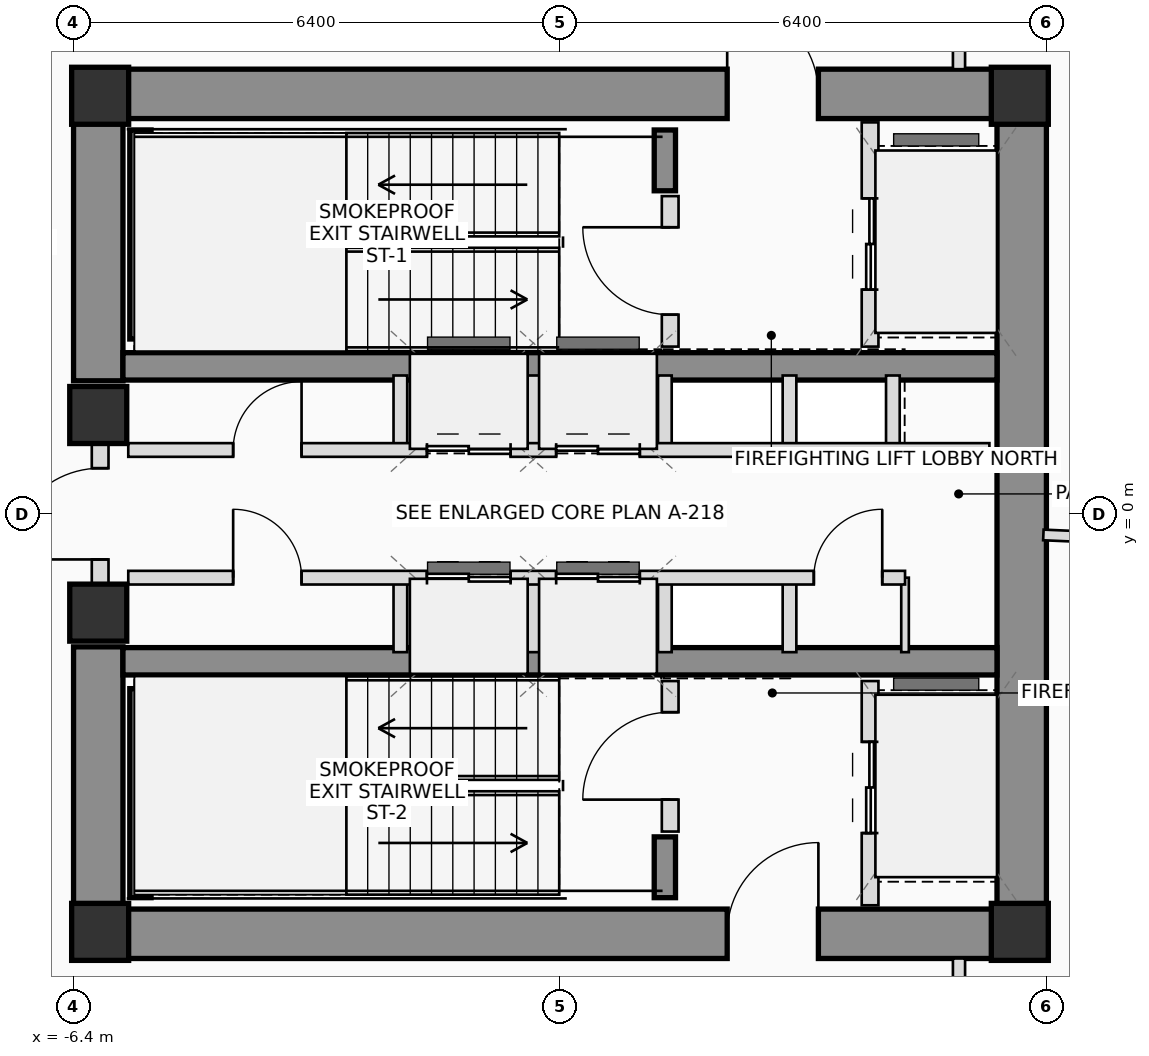
"""IFC4 building model, lengths in metres.
Left out: names, types, materials, properties, quantities, classifications, styles, units other than length and angle.
Written with IfcOpenShell. Run it as: python <this file> out.ifc"""

import sys

from ifc_helpers import new_model, si_unit, direction, frame, frame_2d, origin, origin_2d, place, context, subcontext, project, spatial, rectangle, extrude, source, transform, mapped, element, fill, save


model = new_model("IFC4")
c1 = context("Model", 3, precision=1e-05, world=origin(), true_north=direction((0.0, 1.0)))
c2 = subcontext(c1, "Body", "Model", "MODEL_VIEW")
j1 = project(units=[si_unit("LENGTHUNIT", "METRE"), si_unit("PLANEANGLEUNIT", "RADIAN")], contexts=[c1])
p1 = place(None, origin())
s1 = spatial("IfcSite", under=j1, at=p1, CompositionType="ELEMENT")
p2 = place(p1, origin())
s2 = spatial("IfcBuilding", under=s1, at=p2, CompositionType="ELEMENT")
p3 = place(p2, frame((0.0, 0.0, 191.45)))
s3 = spatial("IfcBuildingStorey", under=s2, at=p3, CompositionType="ELEMENT", Elevation=191.45)
m1 = source(origin(), c2, "Body", "SweptSolid", [
    extrude(rectangle(XDim=0.75, YDim=0.75, at=origin_2d()), origin(), (0.0, 0.0, 1.0), 3.45),
])
for number, where, z_axis, x_axis in (
    (1, (-6.05, -5.5, 0.0), (0.0, 0.0, 1.0), (1.0, 0.0, 0.0)),
    (2, (6.05, -5.5, 0.0), (0.0, 0.0, 1.0), (1.0, 0.0, 0.0)),
    (3, (6.05, 5.5, 0.0), (0.0, 0.0, 1.0), (1.0, 0.0, 0.0)),
    (4, (-6.05, 5.5, 0.0), (0.0, 0.0, 1.0), (1.0, 0.0, 0.0)),
):
    element("IfcColumn", number, at=place(p3, frame(where, z_axis=z_axis, x_axis=x_axis)), inside=s3, PredefinedType="COLUMN", context=c2, shape_type="MappedRepresentation", body=[
        mapped(m1, transform((0.0, 0.0, 0.0), scale=1.0)),
    ])
p4 = place(p3, frame((-6.4, 5.525, 0.0), z_axis=(0.0, 0.0, 1.0), x_axis=(1.0, 0.0, 0.0)))
e5 = element("IfcWall", 5, at=p4, inside=s3, PredefinedType="SHEAR", context=c2, shape_type="SweptSolid", body=[
    extrude(rectangle(XDim=12.8, YDim=0.65, at=frame_2d((6.4, 0.0))), origin(), (0.0, 0.0, 1.0), 3.45),
])
p5 = place(p4, frame((8.6, 0.0, 0.0)))
e6 = element("IfcOpeningElement", 6, at=p5, cuts=e5, PredefinedType="OPENING", context=c2, shape_type="SweptSolid", body=[
    extrude(rectangle(XDim=1.2, YDim=2.2, at=frame_2d((0.6, 1.1))), frame((0.0, 0.335, 0.0), z_axis=(0.0, -1.0, 0.0), x_axis=(1.0, 0.0, 0.0)), (0.0, 0.0, 1.0), 0.67),
])
p6 = place(p3, frame((-6.4, -5.525, 0.0), z_axis=(0.0, 0.0, 1.0), x_axis=(1.0, 0.0, 0.0)))
e7 = element("IfcWall", 7, at=p6, inside=s3, PredefinedType="SHEAR", context=c2, shape_type="SweptSolid", body=[
    extrude(rectangle(XDim=12.8, YDim=0.65, at=frame_2d((6.4, 0.0))), origin(), (0.0, 0.0, 1.0), 3.45),
])
p7 = place(p6, frame((8.6, 0.0, 0.0)))
e8 = element("IfcOpeningElement", 8, at=p7, cuts=e7, PredefinedType="OPENING", context=c2, shape_type="SweptSolid", body=[
    extrude(rectangle(XDim=1.2, YDim=2.2, at=frame_2d((0.6, 1.1))), frame((0.0, 0.335, 0.0), z_axis=(0.0, -1.0, 0.0), x_axis=(1.0, 0.0, 0.0)), (0.0, 0.0, 1.0), 0.67),
])
p8 = place(p3, frame((6.075, -5.2, 0.0), z_axis=(0.0, 0.0, 1.0), x_axis=(0.0, 1.0, 0.0)))
e9 = element("IfcWall", 9, at=p8, inside=s3, PredefinedType="SHEAR", context=c2, shape_type="SweptSolid", body=[
    extrude(rectangle(XDim=10.4, YDim=0.65, at=frame_2d((5.2, 0.0))), origin(), (0.0, 0.0, 1.0), 3.45),
])
for number, where, z_axis, x_axis in (
    (10, (-6.075, -5.2, 0.0), (0.0, 0.0, 1.0), (0.0, 1.0, 0.0)),
    (11, (-6.075, 1.75, 0.0), (0.0, 0.0, 1.0), (0.0, 1.0, 0.0)),
):
    element("IfcWall", number, at=place(p3, frame(where, z_axis=z_axis, x_axis=x_axis)), inside=s3, PredefinedType="SHEAR", context=c2, shape_type="SweptSolid", body=[
        extrude(rectangle(XDim=3.45, YDim=0.65, at=frame_2d((1.725, 0.0))), origin(), (0.0, 0.0, 1.0), 3.45),
    ])
for number, where, z_axis, x_axis in (
    (12, (-5.75, 1.94, 0.0), (0.0, 0.0, 1.0), (1.0, 0.0, 0.0)),
    (13, (-5.75, -1.94, 0.0), (0.0, 0.0, 1.0), (1.0, 0.0, 0.0)),
):
    element("IfcWall", number, at=place(p3, frame(where, z_axis=z_axis, x_axis=x_axis)), inside=s3, PredefinedType="SHEAR", context=c2, shape_type="SweptSolid", body=[
        extrude(rectangle(XDim=11.5, YDim=0.36, at=frame_2d((5.75, 0.0))), origin(), (0.0, 0.0, 1.0), 3.45),
    ])
p9 = place(p3, frame((-5.52, 2.3, 0.0), z_axis=(0.0, 0.0, 1.0), x_axis=(0.0, 1.0, 0.0)))
e14 = element("IfcWall", 14, at=p9, inside=s3, PredefinedType="SHEAR", context=c2, shape_type="SweptSolid", body=[
    extrude(rectangle(XDim=2.75, YDim=0.28, at=frame_2d((1.375, 0.0))), origin(), (0.0, 0.0, 1.0), 3.45),
])
p10 = place(p3, frame((1.38, 4.25, 0.0), z_axis=(0.0, 0.0, 1.0), x_axis=(0.0, 1.0, 0.0)))
e15 = element("IfcWall", 15, at=p10, inside=s3, PredefinedType="SHEAR", context=c2, shape_type="SweptSolid", body=[
    extrude(rectangle(XDim=0.8, YDim=0.28, at=frame_2d((0.4, 0.0))), origin(), (0.0, 0.0, 1.0), 3.45),
])
p11 = place(p3, frame((-5.52, -5.05, 0.0), z_axis=(0.0, 0.0, 1.0), x_axis=(0.0, 1.0, 0.0)))
e16 = element("IfcWall", 16, at=p11, inside=s3, PredefinedType="SHEAR", context=c2, shape_type="SweptSolid", body=[
    extrude(rectangle(XDim=2.75, YDim=0.28, at=frame_2d((1.375, 0.0))), origin(), (0.0, 0.0, 1.0), 3.45),
])
p12 = place(p3, frame((1.38, -5.05, 0.0), z_axis=(0.0, 0.0, 1.0), x_axis=(0.0, 1.0, 0.0)))
e17 = element("IfcWall", 17, at=p12, inside=s3, PredefinedType="SHEAR", context=c2, shape_type="SweptSolid", body=[
    extrude(rectangle(XDim=0.8, YDim=0.28, at=frame_2d((0.4, 0.0))), origin(), (0.0, 0.0, 1.0), 3.45),
])
for number, where, z_axis, x_axis in (
    (18, (-6.075, -1.3, 0.0), (0.0, 0.0, 1.0), (1.0, 0.0, 0.0)),
    (19, (-6.075, 1.3, 0.0), (0.0, 0.0, 1.0), (1.0, 0.0, 0.0)),
):
    element("IfcColumn", number, at=place(p3, frame(where, z_axis=z_axis, x_axis=x_axis)), inside=s3, PredefinedType="COLUMN", context=c2, shape_type="MappedRepresentation", body=[
        mapped(m1, transform((0.0, 0.0, 0.0), scale=1.0)),
    ])
p13 = place(p3, frame((-6.05, -0.95, 0.0), z_axis=(0.0, 0.0, 1.0), x_axis=(0.0, 1.0, 0.0)))
e20 = element("IfcWall", 20, at=p13, inside=s3, PredefinedType="PLUMBINGWALL", context=c2, shape_type="SweptSolid", body=[
    extrude(rectangle(XDim=1.9, YDim=0.22, at=frame_2d((0.95, 0.0))), origin(), (0.0, 0.0, 1.0), 2.23),
])
p14 = place(p13, frame((0.35, 0.0, 0.0)))
e21 = element("IfcOpeningElement", 21, at=p14, cuts=e20, PredefinedType="OPENING", context=c2, shape_type="SweptSolid", body=[
    extrude(rectangle(XDim=1.2, YDim=2.2, at=frame_2d((0.6, 1.1))), frame((0.0, 0.12, 0.0), z_axis=(0.0, -1.0, 0.0), x_axis=(1.0, 0.0, 0.0)), (0.0, 0.0, 1.0), 0.24),
])
p15 = place(p3, frame((1.45, 2.2, 0.0), z_axis=(0.0, 0.0, 1.0), x_axis=(0.0, 1.0, 0.0)))
e22 = element("IfcWall", 22, at=p15, inside=s3, PredefinedType="PLUMBINGWALL", context=c2, shape_type="SweptSolid", body=[
    extrude(rectangle(XDim=1.98, YDim=0.22, at=frame_2d((0.99, 0.0))), origin(), (0.0, 0.0, 1.0), 3.25),
])
p16 = place(p15, frame((0.42, 0.0, 0.0)))
e23 = element("IfcOpeningElement", 23, at=p16, cuts=e22, PredefinedType="OPENING", context=c2, shape_type="SweptSolid", body=[
    extrude(rectangle(XDim=1.15, YDim=2.15, at=frame_2d((0.575, 1.075))), frame((0.0, 0.12, 0.0), z_axis=(0.0, -1.0, 0.0), x_axis=(1.0, 0.0, 0.0)), (0.0, 0.0, 1.0), 0.24),
])
p17 = place(p3, frame((4.08, 2.2, 0.0), z_axis=(0.0, 0.0, 1.0), x_axis=(0.0, 1.0, 0.0)))
e24 = element("IfcWall", 24, at=p17, inside=s3, PredefinedType="PLUMBINGWALL", context=c2, shape_type="SweptSolid", body=[
    extrude(rectangle(XDim=2.95, YDim=0.22, at=frame_2d((1.475, 0.0))), origin(), (0.0, 0.0, 1.0), 3.25),
])
p18 = place(p17, frame((0.75, 0.0, 0.0)))
e25 = element("IfcOpeningElement", 25, at=p18, cuts=e24, PredefinedType="OPENING", context=c2, shape_type="SweptSolid", body=[
    extrude(rectangle(XDim=1.2, YDim=2.25, at=frame_2d((0.6, 1.125))), frame((0.0, 0.12, 0.0), z_axis=(0.0, -1.0, 0.0), x_axis=(1.0, 0.0, 0.0)), (0.0, 0.0, 1.0), 0.24),
])
p19 = place(p3, frame((1.45, -4.18, 0.0), z_axis=(0.0, 0.0, 1.0), x_axis=(0.0, 1.0, 0.0)))
e26 = element("IfcWall", 26, at=p19, inside=s3, PredefinedType="PLUMBINGWALL", context=c2, shape_type="SweptSolid", body=[
    extrude(rectangle(XDim=1.98, YDim=0.22, at=frame_2d((0.99, 0.0))), origin(), (0.0, 0.0, 1.0), 3.25),
])
p20 = place(p19, frame((0.42, 0.0, 0.0)))
e27 = element("IfcOpeningElement", 27, at=p20, cuts=e26, PredefinedType="OPENING", context=c2, shape_type="SweptSolid", body=[
    extrude(rectangle(XDim=1.15, YDim=2.15, at=frame_2d((0.575, 1.075))), frame((0.0, 0.12, 0.0), z_axis=(0.0, -1.0, 0.0), x_axis=(1.0, 0.0, 0.0)), (0.0, 0.0, 1.0), 0.24),
])
p21 = place(p3, frame((4.08, -5.15, 0.0), z_axis=(0.0, 0.0, 1.0), x_axis=(0.0, 1.0, 0.0)))
e28 = element("IfcWall", 28, at=p21, inside=s3, PredefinedType="PLUMBINGWALL", context=c2, shape_type="SweptSolid", body=[
    extrude(rectangle(XDim=2.95, YDim=0.22, at=frame_2d((1.475, 0.0))), origin(), (0.0, 0.0, 1.0), 3.25),
])
p22 = place(p21, frame((0.95, 0.0, 0.0)))
e29 = element("IfcOpeningElement", 29, at=p22, cuts=e28, PredefinedType="OPENING", context=c2, shape_type="SweptSolid", body=[
    extrude(rectangle(XDim=1.2, YDim=2.25, at=frame_2d((0.6, 1.125))), frame((0.0, 0.12, 0.0), z_axis=(0.0, -1.0, 0.0), x_axis=(1.0, 0.0, 0.0)), (0.0, 0.0, 1.0), 0.24),
])
for number, where, z_axis, x_axis in (
    (30, (-2.1, 0.84, 0.0), (0.0, 0.0, 1.0), (0.0, 1.0, 0.0)),
    (31, (-2.1, -1.82, 0.0), (0.0, 0.0, 1.0), (0.0, 1.0, 0.0)),
    (32, (-0.35, 0.84, 0.0), (0.0, 0.0, 1.0), (0.0, 1.0, 0.0)),
    (33, (-0.35, -1.82, 0.0), (0.0, 0.0, 1.0), (0.0, 1.0, 0.0)),
    (34, (1.38, 0.84, 0.0), (0.0, 0.0, 1.0), (0.0, 1.0, 0.0)),
    (35, (1.38, -1.82, 0.0), (0.0, 0.0, 1.0), (0.0, 1.0, 0.0)),
    (36, (3.02, 0.84, 0.0), (0.0, 0.0, 1.0), (0.0, 1.0, 0.0)),
    (37, (4.38, 0.84, 0.0), (0.0, 0.0, 1.0), (0.0, 1.0, 0.0)),
    (38, (3.02, -1.82, 0.0), (0.0, 0.0, 1.0), (0.0, 1.0, 0.0)),
):
    element("IfcWall", number, at=place(p3, frame(where, z_axis=z_axis, x_axis=x_axis)), inside=s3, PredefinedType="PLUMBINGWALL", context=c2, shape_type="SweptSolid", body=[
        extrude(rectangle(XDim=0.98, YDim=0.18, at=frame_2d((0.49, 0.0))), origin(), (0.0, 0.0, 1.0), 3.25),
    ])
p23 = place(p3, frame((4.54, -1.82, 0.0), z_axis=(0.0, 0.0, 1.0), x_axis=(0.0, 1.0, 0.0)))
e39 = element("IfcWall", 39, at=p23, inside=s3, PredefinedType="PARTITIONING", context=c2, shape_type="SweptSolid", body=[
    extrude(rectangle(XDim=0.98, YDim=0.1, at=frame_2d((0.49, 0.0))), origin(), (0.0, 0.0, 1.0), 3.25),
])
p24 = place(p3, frame((-5.68, 0.84, 0.0), z_axis=(0.0, 0.0, 1.0), x_axis=(1.0, 0.0, 0.0)))
e40 = element("IfcWall", 40, at=p24, inside=s3, PredefinedType="PLUMBINGWALL", context=c2, shape_type="SweptSolid", body=[
    extrude(rectangle(XDim=11.33, YDim=0.18, at=frame_2d((5.665, 0.0))), origin(), (0.0, 0.0, 1.0), 3.25),
])
p25 = place(p24, frame((1.38, 0.0, 0.0)))
e41 = element("IfcOpeningElement", 41, at=p25, cuts=e40, PredefinedType="OPENING", context=c2, shape_type="SweptSolid", body=[
    extrude(rectangle(XDim=0.9, YDim=2.05, at=frame_2d((0.45, 1.025))), frame((0.0, 0.1, 0.0), z_axis=(0.0, -1.0, 0.0), x_axis=(1.0, 0.0, 0.0)), (0.0, 0.0, 1.0), 0.2),
])
p26 = place(p24, frame((3.93, 0.0, 0.0)))
e42 = element("IfcOpeningElement", 42, at=p26, cuts=e40, PredefinedType="OPENING", context=c2, shape_type="SweptSolid", body=[
    extrude(rectangle(XDim=1.1, YDim=2.2, at=frame_2d((0.55, 1.1))), frame((0.0, 0.1, 0.0), z_axis=(0.0, -1.0, 0.0), x_axis=(1.0, 0.0, 0.0)), (0.0, 0.0, 1.0), 0.2),
])
p27 = place(p24, frame((5.63, 0.0, 0.0)))
e43 = element("IfcOpeningElement", 43, at=p27, cuts=e40, PredefinedType="OPENING", context=c2, shape_type="SweptSolid", body=[
    extrude(rectangle(XDim=1.1, YDim=2.2, at=frame_2d((0.55, 1.1))), frame((0.0, 0.1, 0.0), z_axis=(0.0, -1.0, 0.0), x_axis=(1.0, 0.0, 0.0)), (0.0, 0.0, 1.0), 0.2),
])
p28 = place(p3, frame((-5.68, -0.84, 0.0), z_axis=(0.0, 0.0, 1.0), x_axis=(1.0, 0.0, 0.0)))
e44 = element("IfcWall", 44, at=p28, inside=s3, PredefinedType="PLUMBINGWALL", context=c2, shape_type="SweptSolid", body=[
    extrude(rectangle(XDim=10.22, YDim=0.18, at=frame_2d((5.11, 0.0))), origin(), (0.0, 0.0, 1.0), 3.25),
])
p29 = place(p28, frame((1.38, 0.0, 0.0)))
e45 = element("IfcOpeningElement", 45, at=p29, cuts=e44, PredefinedType="OPENING", context=c2, shape_type="SweptSolid", body=[
    extrude(rectangle(XDim=0.9, YDim=2.05, at=frame_2d((0.45, 1.025))), frame((0.0, 0.1, 0.0), z_axis=(0.0, -1.0, 0.0), x_axis=(1.0, 0.0, 0.0)), (0.0, 0.0, 1.0), 0.2),
])
p30 = place(p28, frame((3.93, 0.0, 0.0)))
e46 = element("IfcOpeningElement", 46, at=p30, cuts=e44, PredefinedType="OPENING", context=c2, shape_type="SweptSolid", body=[
    extrude(rectangle(XDim=1.1, YDim=2.2, at=frame_2d((0.55, 1.1))), frame((0.0, 0.1, 0.0), z_axis=(0.0, -1.0, 0.0), x_axis=(1.0, 0.0, 0.0)), (0.0, 0.0, 1.0), 0.2),
])
p31 = place(p28, frame((5.63, 0.0, 0.0)))
e47 = element("IfcOpeningElement", 47, at=p31, cuts=e44, PredefinedType="OPENING", context=c2, shape_type="SweptSolid", body=[
    extrude(rectangle(XDim=1.1, YDim=2.2, at=frame_2d((0.55, 1.1))), frame((0.0, 0.1, 0.0), z_axis=(0.0, -1.0, 0.0), x_axis=(1.0, 0.0, 0.0)), (0.0, 0.0, 1.0), 0.2),
])
p32 = place(p28, frame((9.02, 0.0, 0.0)))
e48 = element("IfcOpeningElement", 48, at=p32, cuts=e44, PredefinedType="OPENING", context=c2, shape_type="SweptSolid", body=[
    extrude(rectangle(XDim=0.9, YDim=2.05, at=frame_2d((0.45, 1.025))), frame((0.0, 0.1, 0.0), z_axis=(0.0, -1.0, 0.0), x_axis=(1.0, 0.0, 0.0)), (0.0, 0.0, 1.0), 0.2),
])
p33 = place(p3, frame((5.25, 7.5, 0.0), z_axis=(0.0, 0.0, 1.0), x_axis=(0.0, -1.0, 0.0)))
e49 = element("IfcWall", 49, at=p33, inside=s3, PredefinedType="PARTITIONING", context=c2, shape_type="SweptSolid", body=[
    extrude(rectangle(XDim=1.65, YDim=0.16, at=frame_2d((0.825, 0.0))), origin(), (0.0, 0.0, 1.0), 2.605),
])
p34 = place(p3, frame((5.25, -5.85, 0.0), z_axis=(0.0, 0.0, 1.0), x_axis=(0.0, -1.0, 0.0)))
e50 = element("IfcWall", 50, at=p34, inside=s3, PredefinedType="PARTITIONING", context=c2, shape_type="SweptSolid", body=[
    extrude(rectangle(XDim=1.65, YDim=0.16, at=frame_2d((0.825, 0.0))), origin(), (0.0, 0.0, 1.0), 3.25),
])
p35 = place(p3, frame((6.36, -0.278, 0.0), z_axis=(0.0, 0.0, 1.0), x_axis=(0.999047276506, -0.04364102778, 0.0)))
e51 = element("IfcWall", 51, at=p35, inside=s3, PredefinedType="PARTITIONING", context=c2, shape_type="SweptSolid", body=[
    extrude(rectangle(XDim=7.642, YDim=0.14, at=frame_2d((3.821, 0.0))), origin(), (0.0, 0.0, 1.0), 2.605),
])
p36 = place(p5, origin())
e52 = element("IfcDoor", 52, at=p36, inside=s3, OperationType="SINGLE_SWING_LEFT", PredefinedType="DOOR", context=c2, shape_type="SweptSolid", body=[
    extrude(rectangle(XDim=1.2, YDim=2.2, at=frame_2d((0.6, 1.1))), frame((0.0, 0.025, 0.0), z_axis=(0.0, -1.0, 0.0), x_axis=(1.0, 0.0, 0.0)), (0.0, 0.0, 1.0), 0.05),
])
fill(e6, e52)
p37 = place(p7, origin())
e53 = element("IfcDoor", 53, at=p37, inside=s3, OperationType="SINGLE_SWING_RIGHT", PredefinedType="DOOR", context=c2, shape_type="SweptSolid", body=[
    extrude(rectangle(XDim=1.2, YDim=2.2, at=frame_2d((0.6, 1.1))), frame((0.0, 0.025, 0.0), z_axis=(0.0, -1.0, 0.0), x_axis=(1.0, 0.0, 0.0)), (0.0, 0.0, 1.0), 0.05),
])
fill(e8, e53)
p38 = place(p14, origin())
e54 = element("IfcDoor", 54, at=p38, inside=s3, OperationType="SINGLE_SWING_LEFT", PredefinedType="DOOR", context=c2, shape_type="SweptSolid", body=[
    extrude(rectangle(XDim=1.2, YDim=2.2, at=frame_2d((0.6, 1.1))), frame((0.0, 0.025, 0.0), z_axis=(0.0, -1.0, 0.0), x_axis=(1.0, 0.0, 0.0)), (0.0, 0.0, 1.0), 0.05),
])
fill(e21, e54)
p39 = place(p16, origin())
e55 = element("IfcDoor", 55, at=p39, inside=s3, OperationType="SINGLE_SWING_RIGHT", PredefinedType="DOOR", context=c2, shape_type="SweptSolid", body=[
    extrude(rectangle(XDim=1.15, YDim=2.15, at=frame_2d((0.575, 1.075))), frame((0.0, 0.025, 0.0), z_axis=(0.0, -1.0, 0.0), x_axis=(1.0, 0.0, 0.0)), (0.0, 0.0, 1.0), 0.05),
])
fill(e23, e55)
p40 = place(p18, origin())
e56 = element("IfcDoor", 56, at=p40, inside=s3, OperationType="DOUBLE_DOOR_SLIDING", PredefinedType="DOOR", context=c2, shape_type="SweptSolid", body=[
    extrude(rectangle(XDim=1.2, YDim=2.25, at=frame_2d((0.6, 1.125))), frame((0.0, 0.025, 0.0), z_axis=(0.0, -1.0, 0.0), x_axis=(1.0, 0.0, 0.0)), (0.0, 0.0, 1.0), 0.05),
])
fill(e25, e56)
p41 = place(p20, origin())
e57 = element("IfcDoor", 57, at=p41, inside=s3, OperationType="SINGLE_SWING_LEFT", PredefinedType="DOOR", context=c2, shape_type="SweptSolid", body=[
    extrude(rectangle(XDim=1.15, YDim=2.15, at=frame_2d((0.575, 1.075))), frame((0.0, 0.025, 0.0), z_axis=(0.0, -1.0, 0.0), x_axis=(1.0, 0.0, 0.0)), (0.0, 0.0, 1.0), 0.05),
])
fill(e27, e57)
p42 = place(p22, origin())
e58 = element("IfcDoor", 58, at=p42, inside=s3, OperationType="DOUBLE_DOOR_SLIDING", PredefinedType="DOOR", context=c2, shape_type="SweptSolid", body=[
    extrude(rectangle(XDim=1.2, YDim=2.25, at=frame_2d((0.6, 1.125))), frame((0.0, 0.025, 0.0), z_axis=(0.0, -1.0, 0.0), x_axis=(1.0, 0.0, 0.0)), (0.0, 0.0, 1.0), 0.05),
])
fill(e29, e58)
p43 = place(p25, origin())
e59 = element("IfcDoor", 59, at=p43, inside=s3, OperationType="SINGLE_SWING_RIGHT", PredefinedType="DOOR", context=c2, shape_type="SweptSolid", body=[
    extrude(rectangle(XDim=0.9, YDim=2.05, at=frame_2d((0.45, 1.025))), frame((0.0, 0.025, 0.0), z_axis=(0.0, -1.0, 0.0), x_axis=(1.0, 0.0, 0.0)), (0.0, 0.0, 1.0), 0.05),
])
fill(e41, e59)
p44 = place(p26, origin())
e60 = element("IfcDoor", 60, at=p44, inside=s3, OperationType="DOUBLE_DOOR_SLIDING", PredefinedType="DOOR", context=c2, shape_type="SweptSolid", body=[
    extrude(rectangle(XDim=1.1, YDim=2.2, at=frame_2d((0.55, 1.1))), frame((0.0, 0.025, 0.0), z_axis=(0.0, -1.0, 0.0), x_axis=(1.0, 0.0, 0.0)), (0.0, 0.0, 1.0), 0.05),
])
fill(e42, e60)
p45 = place(p27, origin())
e61 = element("IfcDoor", 61, at=p45, inside=s3, OperationType="DOUBLE_DOOR_SLIDING", PredefinedType="DOOR", context=c2, shape_type="SweptSolid", body=[
    extrude(rectangle(XDim=1.1, YDim=2.2, at=frame_2d((0.55, 1.1))), frame((0.0, 0.025, 0.0), z_axis=(0.0, -1.0, 0.0), x_axis=(1.0, 0.0, 0.0)), (0.0, 0.0, 1.0), 0.05),
])
fill(e43, e61)
p46 = place(p29, origin())
e62 = element("IfcDoor", 62, at=p46, inside=s3, OperationType="SINGLE_SWING_LEFT", PredefinedType="DOOR", context=c2, shape_type="SweptSolid", body=[
    extrude(rectangle(XDim=0.9, YDim=2.05, at=frame_2d((0.45, 1.025))), frame((0.0, 0.025, 0.0), z_axis=(0.0, -1.0, 0.0), x_axis=(1.0, 0.0, 0.0)), (0.0, 0.0, 1.0), 0.05),
])
fill(e45, e62)
p47 = place(p30, origin())
e63 = element("IfcDoor", 63, at=p47, inside=s3, OperationType="DOUBLE_DOOR_SLIDING", PredefinedType="DOOR", context=c2, shape_type="SweptSolid", body=[
    extrude(rectangle(XDim=1.1, YDim=2.2, at=frame_2d((0.55, 1.1))), frame((0.0, 0.025, 0.0), z_axis=(0.0, -1.0, 0.0), x_axis=(1.0, 0.0, 0.0)), (0.0, 0.0, 1.0), 0.05),
])
fill(e46, e63)
p48 = place(p31, origin())
e64 = element("IfcDoor", 64, at=p48, inside=s3, OperationType="DOUBLE_DOOR_SLIDING", PredefinedType="DOOR", context=c2, shape_type="SweptSolid", body=[
    extrude(rectangle(XDim=1.1, YDim=2.2, at=frame_2d((0.55, 1.1))), frame((0.0, 0.025, 0.0), z_axis=(0.0, -1.0, 0.0), x_axis=(1.0, 0.0, 0.0)), (0.0, 0.0, 1.0), 0.05),
])
fill(e47, e64)
p49 = place(p32, origin())
e65 = element("IfcDoor", 65, at=p49, inside=s3, OperationType="SINGLE_SWING_RIGHT", PredefinedType="DOOR", context=c2, shape_type="SweptSolid", body=[
    extrude(rectangle(XDim=0.9, YDim=2.05, at=frame_2d((0.45, 1.025))), frame((0.0, 0.025, 0.0), z_axis=(0.0, -1.0, 0.0), x_axis=(1.0, 0.0, 0.0)), (0.0, 0.0, 1.0), 0.05),
])
fill(e48, e65)
save(model, sys.argv[1])
